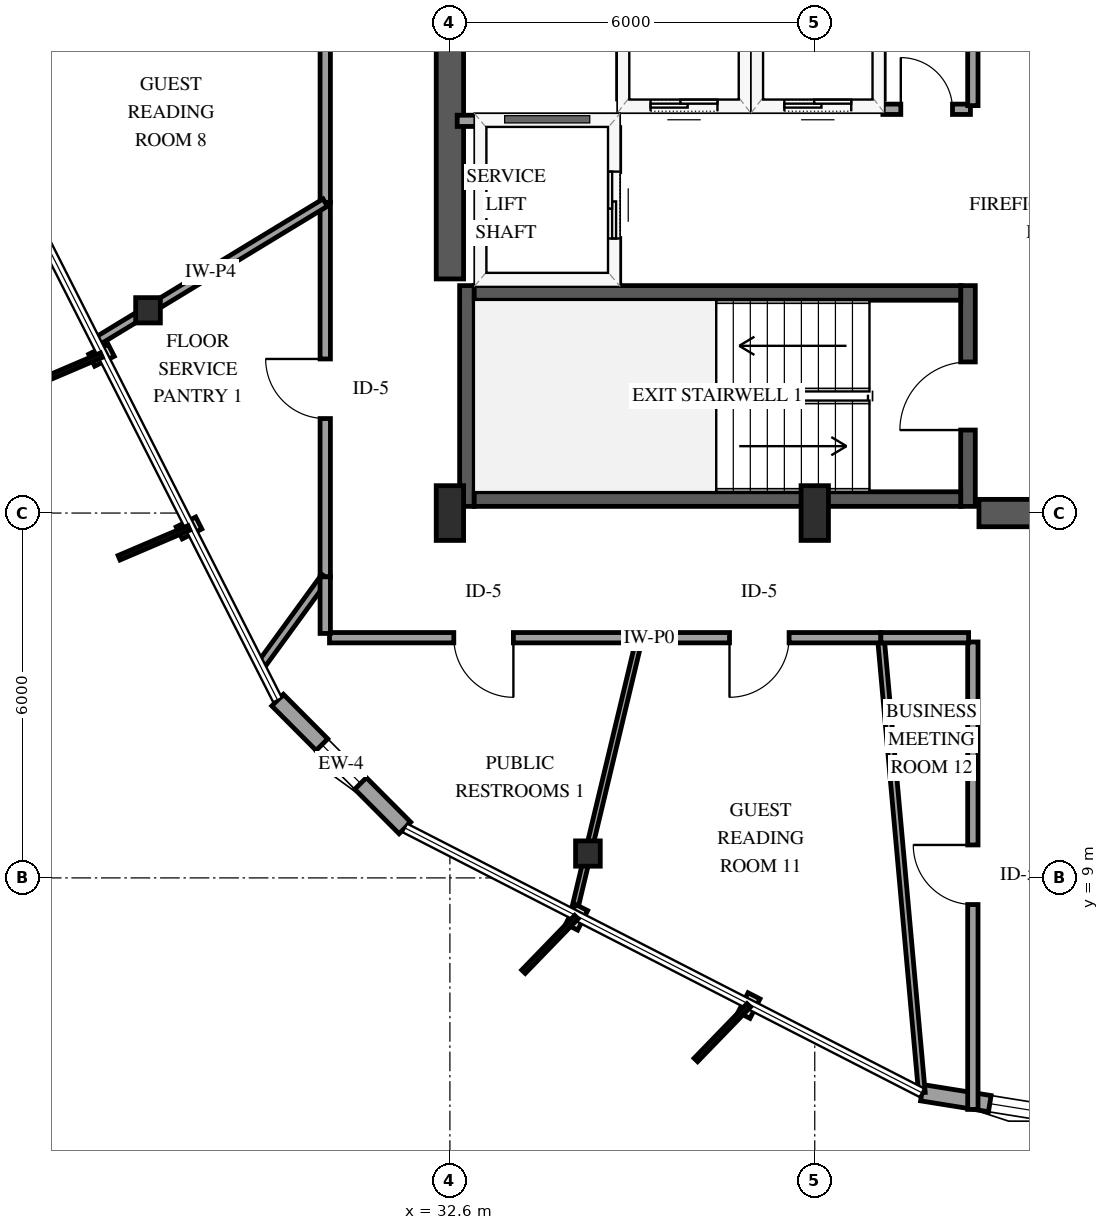
"""IFC4 building model, lengths in metres.
Left out: names, types, materials, properties, quantities, classifications, styles, units other than length and angle.
Written with IfcOpenShell. Run it as: python <this file> out.ifc"""

import sys

from ifc_helpers import new_model, si_unit, direction, frame, frame_2d, origin, origin_2d, place, context, subcontext, project, spatial, rectangle, i_section, extrude, element, fill, save


model = new_model("IFC4")
c1 = context("Model", 3, precision=1e-05, world=origin(), true_north=direction((0.0, 1.0)))
c2 = subcontext(c1, "Body", "Model", "MODEL_VIEW")
j1 = project(units=[si_unit("LENGTHUNIT", "METRE"), si_unit("PLANEANGLEUNIT", "RADIAN")], contexts=[c1])
p1 = place(None, origin())
s1 = spatial("IfcSite", under=j1, at=p1, CompositionType="ELEMENT")
p2 = place(p1, origin())
s2 = spatial("IfcBuilding", under=s1, at=p2, CompositionType="ELEMENT")
p3 = place(p2, frame((0.0, 0.0, 197.8)))
s3 = spatial("IfcBuildingStorey", under=s2, at=p3, CompositionType="ELEMENT", Elevation=197.8)
p4 = place(p3, frame((32.88, 15.11, 0.0), z_axis=(0.0, 0.0, 1.0), x_axis=(0.0, 1.0, 0.0)))
e1 = element("IfcWall", 1, at=p4, inside=s3, PredefinedType="SHEAR", context=c2, shape_type="SweptSolid", body=[
    extrude(rectangle(XDim=3.63, YDim=0.24, at=frame_2d((1.815, 0.0))), origin(), (0.0, 0.0, 1.0), 3.6),
])
p5 = place(p3, frame((41.12, 15.11, 0.0), z_axis=(0.0, 0.0, 1.0), x_axis=(0.0, 1.0, 0.0)))
e2 = element("IfcWall", 2, at=p5, inside=s3, PredefinedType="SHEAR", context=c2, shape_type="SweptSolid", body=[
    extrude(rectangle(XDim=3.63, YDim=0.24, at=frame_2d((1.815, 0.0))), origin(), (0.0, 0.0, 1.0), 3.6),
])
p6 = place(p5, frame((1.255, 0.0, 0.0)))
e3 = element("IfcOpeningElement", 3, at=p6, cuts=e2, PredefinedType="OPENING", context=c2, shape_type="SweptSolid", body=[
    extrude(rectangle(XDim=1.12, YDim=2.15, at=frame_2d((0.56, 1.075))), frame((0.0, 0.13, 0.0), z_axis=(0.0, -1.0, 0.0), x_axis=(1.0, 0.0, 0.0)), (0.0, 0.0, 1.0), 0.26),
])
for number, where, z_axis, x_axis in (
    (4, (33.0, 15.23, 0.0), (0.0, 0.0, 1.0), (1.0, 0.0, 0.0)),
    (5, (33.0, 18.62, 0.0), (0.0, 0.0, 1.0), (1.0, 0.0, 0.0)),
):
    element("IfcWall", number, at=place(p3, frame(where, z_axis=z_axis, x_axis=x_axis)), inside=s3, PredefinedType="SHEAR", context=c2, shape_type="SweptSolid", body=[
        extrude(rectangle(XDim=8.0, YDim=0.24, at=frame_2d((4.0, 0.0))), origin(), (0.0, 0.0, 1.0), 3.6),
    ])
p7 = place(p3, frame((32.6, 18.85, 0.0), z_axis=(0.0, 0.0, 1.0), x_axis=(0.0, 1.0, 0.0)))
e6 = element("IfcWall", 6, at=p7, inside=s3, PredefinedType="SHEAR", context=c2, shape_type="SweptSolid", body=[
    extrude(rectangle(XDim=12.3, YDim=0.45, at=frame_2d((6.15, 0.0))), origin(), (0.0, 0.0, 1.0), 3.6),
])
p8 = place(p3, frame((41.3, 15.0, 0.0), z_axis=(0.0, 0.0, 1.0), x_axis=(1.0, 0.0, 0.0)))
e7 = element("IfcWall", 7, at=p8, inside=s3, PredefinedType="SHEAR", context=c2, shape_type="SweptSolid", body=[
    extrude(rectangle(XDim=2.85, YDim=0.45, at=frame_2d((1.425, 0.0))), origin(), (0.0, 0.0, 1.0), 3.6),
])
for number, where, z_axis, x_axis in (
    (8, (32.6, 15.0, 0.0), (0.0, 0.0, 1.0), (1.0, 0.0, 0.0)),
    (9, (38.6, 15.0, 0.0), (0.0, 0.0, 1.0), (1.0, 0.0, 0.0)),
):
    element("IfcColumn", number, at=place(p3, frame(where, z_axis=z_axis, x_axis=x_axis)), inside=s3, PredefinedType="PILASTER", context=c2, shape_type="SweptSolid", body=[
        extrude(rectangle(XDim=0.45, YDim=0.9, at=origin_2d()), origin(), (0.0, 0.0, 1.0), 3.6),
    ])
for number, where, z_axis, x_axis in (
    (10, (27.635, 18.334, 0.0), (0.0, 0.0, 1.0), (1.0, 0.0, 0.0)),
    (11, (34.87, 9.401, 0.0), (0.0, 0.0, 1.0), (1.0, 0.0, 0.0)),
):
    element("IfcColumn", number, at=place(p3, frame(where, z_axis=z_axis, x_axis=x_axis)), inside=s3, PredefinedType="COLUMN", context=c2, shape_type="SweptSolid", body=[
        extrude(i_section(OverallWidth=0.406, OverallDepth=0.416, WebThickness=0.03, FlangeThickness=0.048, FilletRadius=0.038, at=origin_2d()), origin(), (0.0, 0.0, 1.0), 3.6),
    ])
p9 = place(p3, frame((29.767, 11.924, 0.0), z_axis=(0.0, 0.0, 1.0), x_axis=(0.705623863774, -0.708586595183, 0.0)))
e12 = element("IfcWall", 12, at=p9, inside=s3, PredefinedType="SOLIDWALL", context=c2, shape_type="SweptSolid", body=[
    extrude(rectangle(XDim=2.967, YDim=0.27, at=frame_2d((1.483, 0.0))), origin(), (0.0, 0.0, 1.0), 2.679),
])
p10 = place(p9, frame((1.033, 0.0, 0.75)))
e13 = element("IfcOpeningElement", 13, at=p10, cuts=e12, PredefinedType="OPENING", context=c2, shape_type="SweptSolid", body=[
    extrude(rectangle(XDim=0.9, YDim=1.5, at=frame_2d((0.45, 0.75))), frame((0.0, 0.145, 0.0), z_axis=(0.0, -1.0, 0.0), x_axis=(1.0, 0.0, 0.0)), (0.0, 0.0, 1.0), 0.29),
])
p11 = place(p3, frame((40.362, 5.467, 0.0), z_axis=(0.0, 0.0, 1.0), x_axis=(0.987357295895, -0.158510473609, 0.0)))
e14 = element("IfcWall", 14, at=p11, inside=s3, PredefinedType="SOLIDWALL", context=c2, shape_type="SweptSolid", body=[
    extrude(rectangle(XDim=2.967, YDim=0.27, at=frame_2d((1.483, 0.0))), origin(), (0.0, 0.0, 1.0), 2.679),
])
p12 = place(p11, frame((1.131, 0.0, 0.75)))
e15 = element("IfcOpeningElement", 15, at=p12, cuts=e14, PredefinedType="OPENING", context=c2, shape_type="SweptSolid", body=[
    extrude(rectangle(XDim=0.9, YDim=1.5, at=frame_2d((0.45, 0.75))), frame((0.0, 0.145, 0.0), z_axis=(0.0, -1.0, 0.0), x_axis=(1.0, 0.0, 0.0)), (0.0, 0.0, 1.0), 0.29),
])
p13 = place(p3, frame((35.45, 21.7, 0.0), z_axis=(0.0, 0.0, 1.0), x_axis=(1.0, 0.0, 0.0)))
e16 = element("IfcWall", 16, at=p13, inside=s3, PredefinedType="SOLIDWALL", context=c2, shape_type="SweptSolid", body=[
    extrude(rectangle(XDim=2.0, YDim=0.185, at=frame_2d((1.0, 0.0))), origin(), (0.0, 0.0, 1.0), 3.3),
])
p14 = place(p13, frame((0.45, 0.0, 0.0)))
e17 = element("IfcOpeningElement", 17, at=p14, cuts=e16, PredefinedType="OPENING", context=c2, shape_type="SweptSolid", body=[
    extrude(rectangle(XDim=1.1, YDim=2.15, at=frame_2d((0.55, 1.075))), frame((0.0, 0.103, 0.0), z_axis=(0.0, -1.0, 0.0), x_axis=(1.0, 0.0, 0.0)), (0.0, 0.0, 1.0), 0.205),
])
for number, where, z_axis, x_axis in (
    (18, (35.45, 21.81, 0.0), (0.0, 0.0, 1.0), (0.0, 1.0, 0.0)),
    (19, (37.45, 21.81, 0.0), (0.0, 0.0, 1.0), (0.0, 1.0, 0.0)),
):
    element("IfcWall", number, at=place(p3, frame(where, z_axis=z_axis, x_axis=x_axis)), inside=s3, PredefinedType="SOLIDWALL", context=c2, shape_type="SweptSolid", body=[
        extrude(rectangle(XDim=2.38, YDim=0.185, at=frame_2d((1.19, 0.0))), origin(), (0.0, 0.0, 1.0), 3.3),
    ])
p15 = place(p3, frame((37.65, 21.7, 0.0), z_axis=(0.0, 0.0, 1.0), x_axis=(1.0, 0.0, 0.0)))
e20 = element("IfcWall", 20, at=p15, inside=s3, PredefinedType="SOLIDWALL", context=c2, shape_type="SweptSolid", body=[
    extrude(rectangle(XDim=2.0, YDim=0.185, at=frame_2d((1.0, 0.0))), origin(), (0.0, 0.0, 1.0), 3.3),
])
p16 = place(p15, frame((0.45, 0.0, 0.0)))
e21 = element("IfcOpeningElement", 21, at=p16, cuts=e20, PredefinedType="OPENING", context=c2, shape_type="SweptSolid", body=[
    extrude(rectangle(XDim=1.1, YDim=2.15, at=frame_2d((0.55, 1.075))), frame((0.0, 0.103, 0.0), z_axis=(0.0, -1.0, 0.0), x_axis=(1.0, 0.0, 0.0)), (0.0, 0.0, 1.0), 0.205),
])
p17 = place(p3, frame((39.65, 21.81, 0.0), z_axis=(0.0, 0.0, 1.0), x_axis=(0.0, 1.0, 0.0)))
e22 = element("IfcWall", 22, at=p17, inside=s3, PredefinedType="SOLIDWALL", context=c2, shape_type="SweptSolid", body=[
    extrude(rectangle(XDim=2.38, YDim=0.185, at=frame_2d((1.19, 0.0))), origin(), (0.0, 0.0, 1.0), 3.3),
])
p18 = place(p3, frame((32.72, 21.45, 0.0), z_axis=(0.0, 0.0, 1.0), x_axis=(1.0, 0.0, 0.0)))
e23 = element("IfcWall", 23, at=p18, inside=s3, PredefinedType="SOLIDWALL", context=c2, shape_type="SweptSolid", body=[
    extrude(rectangle(XDim=2.58, YDim=0.185, at=frame_2d((1.29, 0.0))), origin(), (0.0, 0.0, 1.0), 3.3),
])
p19 = place(p3, frame((35.3, 18.79, 0.0), z_axis=(0.0, 0.0, 1.0), x_axis=(0.0, 1.0, 0.0)))
e24 = element("IfcWall", 24, at=p19, inside=s3, PredefinedType="SOLIDWALL", context=c2, shape_type="SweptSolid", body=[
    extrude(rectangle(XDim=2.55, YDim=0.185, at=frame_2d((1.275, 0.0))), origin(), (0.0, 0.0, 1.0), 3.3),
])
p20 = place(p19, frame((0.725, 0.0, 0.0)))
e25 = element("IfcOpeningElement", 25, at=p20, cuts=e24, PredefinedType="OPENING", context=c2, shape_type="SweptSolid", body=[
    extrude(rectangle(XDim=1.1, YDim=2.15, at=frame_2d((0.55, 1.075))), frame((0.0, 0.103, 0.0), z_axis=(0.0, -1.0, 0.0), x_axis=(1.0, 0.0, 0.0)), (0.0, 0.0, 1.0), 0.205),
])
p21 = place(p3, frame((30.55, 20.106, 0.0), z_axis=(0.0, 0.0, 1.0), x_axis=(0.0, 1.0, 0.0)))
e26 = element("IfcWall", 26, at=p21, inside=s3, PredefinedType="PARTITIONING", context=c2, shape_type="SweptSolid", body=[
    extrude(rectangle(XDim=8.245, YDim=0.17, at=frame_2d((4.123, 0.0))), origin(), (0.0, 0.0, 1.0), 3.3),
])
p22 = place(p21, frame((3.647, 0.0, 0.0)))
e27 = element("IfcOpeningElement", 27, at=p22, cuts=e26, PredefinedType="OPENING", context=c2, shape_type="SweptSolid", body=[
    extrude(rectangle(XDim=0.98, YDim=2.15, at=frame_2d((0.49, 1.075))), frame((0.0, 0.095, 0.0), z_axis=(0.0, -1.0, 0.0), x_axis=(1.0, 0.0, 0.0)), (0.0, 0.0, 1.0), 0.19),
])
p23 = place(p3, frame((41.2, 5.193, 0.0), z_axis=(0.0, 0.0, 1.0), x_axis=(0.0, 1.0, 0.0)))
e28 = element("IfcWall", 28, at=p23, inside=s3, PredefinedType="PARTITIONING", context=c2, shape_type="SweptSolid", body=[
    extrude(rectangle(XDim=7.687, YDim=0.17, at=frame_2d((3.843, 0.0))), origin(), (0.0, 0.0, 1.0), 3.3),
])
p24 = place(p23, frame((3.369, 0.0, 0.0)))
e29 = element("IfcOpeningElement", 29, at=p24, cuts=e28, PredefinedType="OPENING", context=c2, shape_type="SweptSolid", body=[
    extrude(rectangle(XDim=0.98, YDim=2.15, at=frame_2d((0.49, 1.075))), frame((0.0, 0.095, 0.0), z_axis=(0.0, -1.0, 0.0), x_axis=(1.0, 0.0, 0.0)), (0.0, 0.0, 1.0), 0.19),
])
p25 = place(p3, frame((39.687, 12.95, 0.0), z_axis=(0.0, 0.0, 1.0), x_axis=(0.089847214492, -0.995955560278, 0.0)))
e30 = element("IfcWall", 30, at=p25, inside=s3, PredefinedType="PARTITIONING", context=c2, shape_type="SweptSolid", body=[
    extrude(rectangle(XDim=7.513, YDim=0.11, at=frame_2d((3.757, 0.0))), origin(), (0.0, 0.0, 1.0), 2.678),
])
p26 = place(p3, frame((30.55, 13.951, 0.0), z_axis=(0.0, 0.0, 1.0), x_axis=(0.0, 1.0, 0.0)))
e31 = element("IfcWall", 31, at=p26, inside=s3, PredefinedType="PARTITIONING", context=c2, shape_type="SweptSolid", body=[
    extrude(rectangle(XDim=6.155, YDim=0.17, at=frame_2d((3.078, 0.0))), origin(), (0.0, 0.0, 1.0), 3.3),
])
p27 = place(p26, frame((2.603, 0.0, 0.0)))
e32 = element("IfcOpeningElement", 32, at=p27, cuts=e31, PredefinedType="OPENING", context=c2, shape_type="SweptSolid", body=[
    extrude(rectangle(XDim=0.98, YDim=2.15, at=frame_2d((0.49, 1.075))), frame((0.0, 0.095, 0.0), z_axis=(0.0, -1.0, 0.0), x_axis=(1.0, 0.0, 0.0)), (0.0, 0.0, 1.0), 0.19),
])
p28 = place(p3, frame((35.719, 12.95, 0.0), z_axis=(0.0, 0.0, 1.0), x_axis=(-1.0, 0.0, 0.0)))
e33 = element("IfcWall", 33, at=p28, inside=s3, PredefinedType="PARTITIONING", context=c2, shape_type="SweptSolid", body=[
    extrude(rectangle(XDim=5.099, YDim=0.17, at=frame_2d((2.549, 0.0))), origin(), (0.0, 0.0, 1.0), 3.3),
])
p29 = place(p28, frame((2.075, 0.0, 0.0)))
e34 = element("IfcOpeningElement", 34, at=p29, cuts=e33, PredefinedType="OPENING", context=c2, shape_type="SweptSolid", body=[
    extrude(rectangle(XDim=0.98, YDim=2.15, at=frame_2d((0.49, 1.075))), frame((0.0, 0.095, 0.0), z_axis=(0.0, -1.0, 0.0), x_axis=(1.0, 0.0, 0.0)), (0.0, 0.0, 1.0), 0.19),
])
p30 = place(p3, frame((35.719, 12.95, 0.0), z_axis=(0.0, 0.0, 1.0), x_axis=(-0.232646217393, -0.972561431239, 0.0)))
e35 = element("IfcWall", 35, at=p30, inside=s3, PredefinedType="PARTITIONING", context=c2, shape_type="SweptSolid", body=[
    extrude(rectangle(XDim=4.676, YDim=0.1, at=frame_2d((2.338, 0.0))), origin(), (0.0, 0.0, 1.0), 2.595),
])
p31 = place(p3, frame((30.55, 20.106, 0.0), z_axis=(0.0, 0.0, 1.0), x_axis=(-0.854578769062, -0.519321795679, 0.0)))
e36 = element("IfcWall", 36, at=p31, inside=s3, PredefinedType="PARTITIONING", context=c2, shape_type="SweptSolid", body=[
    extrude(rectangle(XDim=4.412, YDim=0.14, at=frame_2d((2.206, 0.0))), origin(), (0.0, 0.0, 1.0), 3.3),
])
p32 = place(p3, frame((39.687, 12.95, 0.0), z_axis=(0.0, 0.0, 1.0), x_axis=(-1.0, 0.0, 0.0)))
e37 = element("IfcWall", 37, at=p32, inside=s3, PredefinedType="PARTITIONING", context=c2, shape_type="SweptSolid", body=[
    extrude(rectangle(XDim=3.968, YDim=0.17, at=frame_2d((1.984, 0.0))), origin(), (0.0, 0.0, 1.0), 3.3),
])
p33 = place(p32, frame((1.509, 0.0, 0.0)))
e38 = element("IfcOpeningElement", 38, at=p33, cuts=e37, PredefinedType="OPENING", context=c2, shape_type="SweptSolid", body=[
    extrude(rectangle(XDim=0.98, YDim=2.15, at=frame_2d((0.49, 1.075))), frame((0.0, 0.095, 0.0), z_axis=(0.0, -1.0, 0.0), x_axis=(1.0, 0.0, 0.0)), (0.0, 0.0, 1.0), 0.19),
])
p34 = place(p3, frame((30.55, 13.951, 0.0), z_axis=(0.0, 0.0, 1.0), x_axis=(-0.588915801742, -0.808194393979, 0.0)))
e39 = element("IfcWall", 39, at=p34, inside=s3, PredefinedType="PARTITIONING", context=c2, shape_type="SweptSolid", body=[
    extrude(rectangle(XDim=1.814, YDim=0.14, at=frame_2d((0.907, 0.0))), origin(), (0.0, 0.0, 1.0), 3.3),
])
p35 = place(p3, frame((41.13, 12.95, 0.0), z_axis=(0.0, 0.0, 1.0), x_axis=(-1.0, 0.0, 0.0)))
e40 = element("IfcWall", 40, at=p35, inside=s3, PredefinedType="PARTITIONING", context=c2, shape_type="SweptSolid", body=[
    extrude(rectangle(XDim=1.443, YDim=0.17, at=frame_2d((0.721, 0.0))), origin(), (0.0, 0.0, 1.0), 3.3),
])
p36 = place(p3, frame((39.72, 21.64, 0.0), z_axis=(0.0, 0.0, 1.0), x_axis=(1.0, 0.0, 0.0)))
e41 = element("IfcWall", 41, at=p36, inside=s3, PredefinedType="PARTITIONING", context=c2, shape_type="SweptSolid", body=[
    extrude(rectangle(XDim=1.44, YDim=0.17, at=frame_2d((0.72, 0.0))), origin(), (0.0, 0.0, 1.0), 3.3),
])
p37 = place(p36, frame((0.295, 0.0, 0.0)))
e42 = element("IfcOpeningElement", 42, at=p37, cuts=e41, PredefinedType="OPENING", context=c2, shape_type="SweptSolid", body=[
    extrude(rectangle(XDim=0.85, YDim=2.1, at=frame_2d((0.425, 1.05))), frame((0.0, 0.095, 0.0), z_axis=(0.0, -1.0, 0.0), x_axis=(1.0, 0.0, 0.0)), (0.0, 0.0, 1.0), 0.19),
])
p38 = place(p3, frame((41.2, 21.7, 0.0), z_axis=(0.0, 0.0, 1.0), x_axis=(0.0, 1.0, 0.0)))
e43 = element("IfcWall", 43, at=p38, inside=s3, PredefinedType="PARTITIONING", context=c2, shape_type="SweptSolid", body=[
    extrude(rectangle(XDim=1.12, YDim=0.17, at=frame_2d((0.56, 0.0))), origin(), (0.0, 0.0, 1.0), 3.3),
])
p39 = place(p3, frame((30.55, 13.02, 0.0), z_axis=(0.0, 0.0, 1.0), x_axis=(0.0, 1.0, 0.0)))
e44 = element("IfcWall", 44, at=p39, inside=s3, PredefinedType="PARTITIONING", context=c2, shape_type="SweptSolid", body=[
    extrude(rectangle(XDim=0.931, YDim=0.17, at=frame_2d((0.465, 0.0))), origin(), (0.0, 0.0, 1.0), 3.3),
])
p40 = place(p10, origin())
e45 = element("IfcWindow", 45, at=p40, inside=s3, PartitioningType="SINGLE_PANEL", PredefinedType="WINDOW", context=c2, shape_type="SweptSolid", body=[
    extrude(rectangle(XDim=0.9, YDim=1.5, at=frame_2d((0.45, 0.75))), frame((0.0, 0.03, 0.0), z_axis=(0.0, -1.0, 0.0), x_axis=(1.0, 0.0, 0.0)), (0.0, 0.0, 1.0), 0.06),
])
fill(e13, e45)
p41 = place(p12, origin())
e46 = element("IfcWindow", 46, at=p41, inside=s3, PartitioningType="SINGLE_PANEL", PredefinedType="WINDOW", context=c2, shape_type="SweptSolid", body=[
    extrude(rectangle(XDim=0.9, YDim=1.5, at=frame_2d((0.45, 0.75))), frame((0.0, 0.03, 0.0), z_axis=(0.0, -1.0, 0.0), x_axis=(1.0, 0.0, 0.0)), (0.0, 0.0, 1.0), 0.06),
])
fill(e15, e46)
p42 = place(p14, origin())
e47 = element("IfcDoor", 47, at=p42, inside=s3, OperationType="SLIDING_TO_LEFT", PredefinedType="DOOR", context=c2, shape_type="SweptSolid", body=[
    extrude(rectangle(XDim=1.1, YDim=2.15, at=frame_2d((0.55, 1.075))), frame((0.0, 0.025, 0.0), z_axis=(0.0, -1.0, 0.0), x_axis=(1.0, 0.0, 0.0)), (0.0, 0.0, 1.0), 0.05),
])
fill(e17, e47)
p43 = place(p16, origin())
e48 = element("IfcDoor", 48, at=p43, inside=s3, OperationType="SLIDING_TO_LEFT", PredefinedType="DOOR", context=c2, shape_type="SweptSolid", body=[
    extrude(rectangle(XDim=1.1, YDim=2.15, at=frame_2d((0.55, 1.075))), frame((0.0, 0.025, 0.0), z_axis=(0.0, -1.0, 0.0), x_axis=(1.0, 0.0, 0.0)), (0.0, 0.0, 1.0), 0.05),
])
fill(e21, e48)
p44 = place(p20, origin())
e49 = element("IfcDoor", 49, at=p44, inside=s3, OperationType="SLIDING_TO_LEFT", PredefinedType="DOOR", context=c2, shape_type="SweptSolid", body=[
    extrude(rectangle(XDim=1.1, YDim=2.15, at=frame_2d((0.55, 1.075))), frame((0.0, 0.025, 0.0), z_axis=(0.0, -1.0, 0.0), x_axis=(1.0, 0.0, 0.0)), (0.0, 0.0, 1.0), 0.05),
])
fill(e25, e49)
p45 = place(p6, origin())
e50 = element("IfcDoor", 50, at=p45, inside=s3, OperationType="SINGLE_SWING_LEFT", PredefinedType="DOOR", context=c2, shape_type="SweptSolid", body=[
    extrude(rectangle(XDim=1.12, YDim=2.15, at=frame_2d((0.56, 1.075))), frame((0.0, 0.025, 0.0), z_axis=(0.0, -1.0, 0.0), x_axis=(1.0, 0.0, 0.0)), (0.0, 0.0, 1.0), 0.05),
])
fill(e3, e50)
p46 = place(p24, origin())
e51 = element("IfcDoor", 51, at=p46, inside=s3, OperationType="SINGLE_SWING_RIGHT", PredefinedType="DOOR", context=c2, shape_type="SweptSolid", body=[
    extrude(rectangle(XDim=0.98, YDim=2.15, at=frame_2d((0.49, 1.075))), frame((0.0, 0.025, 0.0), z_axis=(0.0, -1.0, 0.0), x_axis=(1.0, 0.0, 0.0)), (0.0, 0.0, 1.0), 0.05),
])
fill(e29, e51)
p47 = place(p27, origin())
e52 = element("IfcDoor", 52, at=p47, inside=s3, OperationType="SINGLE_SWING_RIGHT", PredefinedType="DOOR", context=c2, shape_type="SweptSolid", body=[
    extrude(rectangle(XDim=0.98, YDim=2.15, at=frame_2d((0.49, 1.075))), frame((0.0, 0.025, 0.0), z_axis=(0.0, -1.0, 0.0), x_axis=(1.0, 0.0, 0.0)), (0.0, 0.0, 1.0), 0.05),
])
fill(e32, e52)
p48 = place(p29, origin())
e53 = element("IfcDoor", 53, at=p48, inside=s3, OperationType="SINGLE_SWING_LEFT", PredefinedType="DOOR", context=c2, shape_type="SweptSolid", body=[
    extrude(rectangle(XDim=0.98, YDim=2.15, at=frame_2d((0.49, 1.075))), frame((0.0, 0.025, 0.0), z_axis=(0.0, -1.0, 0.0), x_axis=(1.0, 0.0, 0.0)), (0.0, 0.0, 1.0), 0.05),
])
fill(e34, e53)
p49 = place(p33, origin())
e54 = element("IfcDoor", 54, at=p49, inside=s3, OperationType="SINGLE_SWING_RIGHT", PredefinedType="DOOR", context=c2, shape_type="SweptSolid", body=[
    extrude(rectangle(XDim=0.98, YDim=2.15, at=frame_2d((0.49, 1.075))), frame((0.0, 0.025, 0.0), z_axis=(0.0, -1.0, 0.0), x_axis=(1.0, 0.0, 0.0)), (0.0, 0.0, 1.0), 0.05),
])
fill(e38, e54)
p50 = place(p37, origin())
e55 = element("IfcDoor", 55, at=p50, inside=s3, OperationType="SINGLE_SWING_LEFT", PredefinedType="DOOR", context=c2, shape_type="SweptSolid", body=[
    extrude(rectangle(XDim=0.85, YDim=2.1, at=frame_2d((0.425, 1.05))), frame((0.0, 0.025, 0.0), z_axis=(0.0, -1.0, 0.0), x_axis=(1.0, 0.0, 0.0)), (0.0, 0.0, 1.0), 0.05),
])
fill(e42, e55)
save(model, sys.argv[1])
